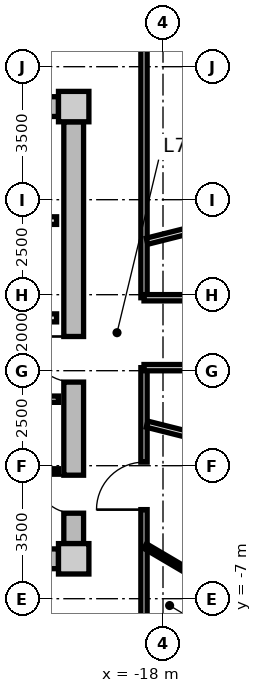
"""IFC4 building model, lengths in metres.
Left out: names, types, materials, properties, quantities, classifications, styles, units other than length and angle.
Written with IfcOpenShell. Run it as: python <this file> out.ifc"""

import sys

from ifc_helpers import new_model, si_unit, direction, frame, frame_2d, origin, origin_2d, place, context, subcontext, project, spatial, rectangle, extrude, source, transform, mapped, element, fill, save


model = new_model("IFC4")
c1 = context("Model", 3, precision=1e-05, world=origin(), true_north=direction((0.0, 1.0)))
c2 = subcontext(c1, "Body", "Model", "MODEL_VIEW")
j1 = project(units=[si_unit("LENGTHUNIT", "METRE"), si_unit("PLANEANGLEUNIT", "RADIAN")], contexts=[c1])
p1 = place(None, origin())
s1 = spatial("IfcSite", under=j1, at=p1, CompositionType="ELEMENT")
p2 = place(p1, origin())
s2 = spatial("IfcBuilding", under=s1, at=p2, CompositionType="ELEMENT")
p3 = place(p2, frame((0.0, 0.0, 226.1)))
s3 = spatial("IfcBuildingStorey", under=s2, at=p3, CompositionType="ELEMENT", Elevation=226.1)
m1 = source(origin(), c2, "Body", "SweptSolid", [
    extrude(rectangle(XDim=0.8, YDim=0.8, at=origin_2d()), origin(), (0.0, 0.0, 1.0), 3.05),
])
for number, where, z_axis, x_axis in (
    (1, (-20.35, -5.95, 0.0), (0.0, 0.0, 1.0), (1.0, 0.0, 0.0)),
    (2, (-20.35, 5.95, 0.0), (0.0, 0.0, 1.0), (1.0, 0.0, 0.0)),
):
    element("IfcColumn", number, at=place(p3, frame(where, z_axis=z_axis, x_axis=x_axis)), inside=s3, PredefinedType="COLUMN", context=c2, shape_type="MappedRepresentation", body=[
        mapped(m1, transform((0.0, 0.0, 0.0), x_axis=(1.0, 0.0, 0.0), y_axis=(0.0, 1.0, 0.0), z_axis=(0.0, 0.0, 1.0), scale=1.0)),
    ])
m2 = source(origin(), c2, "Body", "SweptSolid", [
    extrude(rectangle(XDim=14.5, YDim=0.52, at=frame_2d((7.25, 0.0))), origin(), (0.0, 0.0, 1.0), 2.76),
])
for number, where, z_axis, x_axis in (
    (3, (-35.25, 5.95, 0.0), (0.0, 0.0, 1.0), (1.0, 0.0, 0.0)),
    (4, (-20.75, -5.95, 0.0), (0.0, 0.0, 1.0), (-1.0, 0.0, 0.0)),
):
    element("IfcWall", number, at=place(p3, frame(where, z_axis=z_axis, x_axis=x_axis)), inside=s3, PredefinedType="SHEAR", context=c2, shape_type="MappedRepresentation", body=[
        mapped(m2, transform((0.0, 0.0, 0.0), x_axis=(1.0, 0.0, 0.0), y_axis=(0.0, 1.0, 0.0), z_axis=(0.0, 0.0, 1.0), scale=1.0)),
    ])
m3 = source(origin(), c2, "Body", "SweptSolid", [
    extrude(rectangle(XDim=11.1, YDim=0.52, at=frame_2d((5.55, 0.0))), origin(), (0.0, 0.0, 1.0), 2.76),
])
p4 = place(p3, frame((-20.35, 5.55, 0.0), z_axis=(0.0, 0.0, 1.0), x_axis=(0.0, -1.0, 0.0)))
e5 = element("IfcWall", 5, at=p4, inside=s3, PredefinedType="SHEAR", context=c2, shape_type="MappedRepresentation", body=[
    mapped(m3, transform((0.0, 0.0, 0.0), x_axis=(1.0, 0.0, 0.0), y_axis=(0.0, 1.0, 0.0), z_axis=(0.0, 0.0, 1.0), scale=1.0)),
])
p5 = place(p4, frame((5.65, 0.0, 0.0)))
e6 = element("IfcOpeningElement", 6, at=p5, cuts=e5, PredefinedType="OPENING", context=c2, shape_type="SweptSolid", body=[
    extrude(rectangle(XDim=1.2, YDim=2.15, at=frame_2d((0.6, 1.075))), frame((0.0, 0.27, 0.0), z_axis=(0.0, -1.0, 0.0), x_axis=(1.0, 0.0, 0.0)), (0.0, 0.0, 1.0), 0.54),
])
p6 = place(p4, frame((9.3, 0.0, 0.0)))
e7 = element("IfcOpeningElement", 7, at=p6, cuts=e5, PredefinedType="OPENING", context=c2, shape_type="SweptSolid", body=[
    extrude(rectangle(XDim=1.0, YDim=2.1, at=frame_2d((0.5, 1.05))), frame((0.0, 0.27, 0.0), z_axis=(0.0, -1.0, 0.0), x_axis=(1.0, 0.0, 0.0)), (0.0, 0.0, 1.0), 0.54),
])
m4 = source(origin(), c2, "Body", "SweptSolid", [
    extrude(rectangle(XDim=3.2, YDim=0.2, at=frame_2d((1.6, 0.0))), origin(), (0.0, 0.0, 1.0), 2.745),
])
p7 = place(p3, frame((-24.0, 2.95, 0.0), z_axis=(0.0, 0.0, 1.0), x_axis=(1.0, 0.0, 0.0)))
e8 = element("IfcWall", 8, at=p7, inside=s3, PredefinedType="PARTITIONING", context=c2, shape_type="MappedRepresentation", body=[
    mapped(m4, transform((0.0, 0.0, 0.0), x_axis=(1.0, 0.0, 0.0), y_axis=(0.0, 1.0, 0.0), z_axis=(0.0, 0.0, 1.0), scale=1.0)),
])
m5 = source(origin(), c2, "Body", "SweptSolid", [
    extrude(rectangle(XDim=6.66, YDim=0.21, at=frame_2d((3.33, 0.0))), origin(), (0.0, 0.0, 1.0), 2.745),
])
p8 = place(p3, frame((-27.46, 0.39, 0.0), z_axis=(0.0, 0.0, 1.0), x_axis=(1.0, 0.0, 0.0)))
e9 = element("IfcWall", 9, at=p8, inside=s3, PredefinedType="PARTITIONING", context=c2, shape_type="MappedRepresentation", body=[
    mapped(m5, transform((0.0, 0.0, 0.0), x_axis=(1.0, 0.0, 0.0), y_axis=(0.0, 1.0, 0.0), z_axis=(0.0, 0.0, 1.0), scale=1.0)),
])
p9 = place(p8, frame((1.0, 0.0, 0.0)))
e10 = element("IfcOpeningElement", 10, at=p9, cuts=e9, PredefinedType="OPENING", context=c2, shape_type="SweptSolid", body=[
    extrude(rectangle(XDim=1.2, YDim=2.15, at=frame_2d((0.6, 1.075))), frame((0.0, 0.115, 0.0), z_axis=(0.0, -1.0, 0.0), x_axis=(1.0, 0.0, 0.0)), (0.0, 0.0, 1.0), 0.23),
])
m6 = source(origin(), c2, "Body", "SweptSolid", [
    extrude(rectangle(XDim=2.7, YDim=0.165, at=frame_2d((1.35, 0.0))), origin(), (0.0, 0.0, 1.0), 2.745),
])
p10 = place(p3, frame((-23.45, -1.75, 0.0), z_axis=(0.0, 0.0, 1.0), x_axis=(1.0, 0.0, 0.0)))
e11 = element("IfcWall", 11, at=p10, inside=s3, PredefinedType="PARTITIONING", context=c2, shape_type="MappedRepresentation", body=[
    mapped(m6, transform((0.0, 0.0, 0.0), x_axis=(1.0, 0.0, 0.0), y_axis=(0.0, 1.0, 0.0), z_axis=(0.0, 0.0, 1.0), scale=1.0)),
])
p11 = place(p10, frame((0.85, 0.0, 0.0)))
e12 = element("IfcOpeningElement", 12, at=p11, cuts=e11, PredefinedType="OPENING", context=c2, shape_type="SweptSolid", body=[
    extrude(rectangle(XDim=0.925, YDim=2.1, at=frame_2d((0.462, 1.05))), frame((0.0, 0.093, 0.0), z_axis=(0.0, -1.0, 0.0), x_axis=(1.0, 0.0, 0.0)), (0.0, 0.0, 1.0), 0.185),
])
m7 = source(origin(), c2, "Body", "SweptSolid", [
    extrude(rectangle(XDim=2.7, YDim=0.14, at=frame_2d((1.35, 0.0))), origin(), (0.0, 0.0, 1.0), 2.745),
])
p12 = place(p3, frame((-23.45, -3.65, 0.0), z_axis=(0.0, 0.0, 1.0), x_axis=(1.0, 0.0, 0.0)))
e13 = element("IfcWall", 13, at=p12, inside=s3, PredefinedType="PARTITIONING", context=c2, shape_type="MappedRepresentation", body=[
    mapped(m7, transform((0.0, 0.0, 0.0), x_axis=(1.0, 0.0, 0.0), y_axis=(0.0, 1.0, 0.0), z_axis=(0.0, 0.0, 1.0), scale=1.0)),
])
m8 = source(origin(), c2, "Body", "SweptSolid", [
    extrude(rectangle(XDim=6.88, YDim=0.165, at=frame_2d((3.44, 0.0))), origin(), (0.0, 0.0, 1.0), 2.745),
])
p13 = place(p3, frame((-18.5, 7.8, 0.0), z_axis=(0.0, 0.0, 1.0), x_axis=(0.0, -1.0, 0.0)))
e14 = element("IfcWall", 14, at=p13, inside=s3, PredefinedType="PARTITIONING", context=c2, shape_type="MappedRepresentation", body=[
    mapped(m8, transform((0.0, 0.0, 0.0), x_axis=(1.0, 0.0, 0.0), y_axis=(0.0, 1.0, 0.0), z_axis=(0.0, 0.0, 1.0), scale=1.0)),
])
p14 = place(p3, frame((-18.5, -0.92, 0.0), z_axis=(0.0, 0.0, 1.0), x_axis=(0.0, -1.0, 0.0)))
e15 = element("IfcWall", 15, at=p14, inside=s3, PredefinedType="PARTITIONING", context=c2, shape_type="MappedRepresentation", body=[
    mapped(m8, transform((0.0, 0.0, 0.0), x_axis=(1.0, 0.0, 0.0), y_axis=(0.0, 1.0, 0.0), z_axis=(0.0, 0.0, 1.0), scale=1.0)),
])
p15 = place(p14, frame((2.486, 0.0, 0.0)))
e16 = element("IfcOpeningElement", 16, at=p15, cuts=e15, PredefinedType="OPENING", context=c2, shape_type="SweptSolid", body=[
    extrude(rectangle(XDim=1.25, YDim=2.2, at=frame_2d((0.625, 1.1))), frame((0.0, 0.093, 0.0), z_axis=(0.0, -1.0, 0.0), x_axis=(1.0, 0.0, 0.0)), (0.0, 0.0, 1.0), 0.185),
])
m9 = source(origin(), c2, "Body", "SweptSolid", [
    extrude(rectangle(XDim=6.157, YDim=0.165, at=frame_2d((3.079, 0.0))), origin(), (0.0, 0.0, 1.0), 2.345),
])
for number, where, z_axis, x_axis in (
    (17, (-18.42, -2.407, 0.0), (0.0, 0.0, 1.0), (0.97, -0.244, 0.0)),
    (18, (-18.42, 2.407, 0.0), (0.0, 0.0, 1.0), (0.97, 0.244, 0.0)),
):
    element("IfcWall", number, at=place(p3, frame(where, z_axis=z_axis, x_axis=x_axis)), inside=s3, PredefinedType="PARTITIONING", context=c2, shape_type="MappedRepresentation", body=[
        mapped(m9, transform((0.0, 0.0, 0.0), x_axis=(1.0, 0.0, 0.0), y_axis=(0.0, 1.0, 0.0), z_axis=(0.0, 0.0, 1.0), scale=1.0)),
    ])
m10 = source(origin(), c2, "Body", "SweptSolid", [
    extrude(rectangle(XDim=1.859, YDim=0.14, at=frame_2d((0.93, 0.0))), origin(), (0.0, 0.0, 1.0), 2.745),
])
p16 = place(p3, frame((-18.47, -5.615, 0.0), z_axis=(0.0, 0.0, 1.0), x_axis=(0.861555897139, -0.507662718845, 0.0)))
e19 = element("IfcWall", 19, at=p16, inside=s3, PredefinedType="PARTITIONING", context=c2, shape_type="MappedRepresentation", body=[
    mapped(m10, transform((0.0, 0.0, 0.0), x_axis=(1.0, 0.0, 0.0), y_axis=(0.0, 1.0, 0.0), z_axis=(0.0, 0.0, 1.0), scale=1.0)),
])
m11 = source(origin(), c2, "Body", "SweptSolid", [
    extrude(rectangle(XDim=2.939, YDim=0.14, at=frame_2d((1.47, 0.0))), origin(), (0.0, 0.0, 1.0), 2.745),
])
p17 = place(p3, frame((-16.868, -6.559, 0.0), z_axis=(0.0, 0.0, 1.0), x_axis=(-0.505883614636, -0.862601743821, 0.0)))
e20 = element("IfcWall", 20, at=p17, inside=s3, PredefinedType="PARTITIONING", context=c2, shape_type="MappedRepresentation", body=[
    mapped(m11, transform((0.0, 0.0, 0.0), x_axis=(1.0, 0.0, 0.0), y_axis=(0.0, 1.0, 0.0), z_axis=(0.0, 0.0, 1.0), scale=1.0)),
])
p18 = place(p17, frame((1.01, 0.0, 0.0)))
e21 = element("IfcOpeningElement", 21, at=p18, cuts=e20, PredefinedType="OPENING", context=c2, shape_type="SweptSolid", body=[
    extrude(rectangle(XDim=0.92, YDim=2.1, at=frame_2d((0.46, 1.05))), frame((0.0, 0.08, 0.0), z_axis=(0.0, -1.0, 0.0), x_axis=(1.0, 0.0, 0.0)), (0.0, 0.0, 1.0), 0.16),
])
m12 = source(origin(), c2, "Body", "SweptSolid", [
    extrude(rectangle(XDim=37.0, YDim=0.165, at=frame_2d((18.5, 0.0))), origin(), (0.0, 0.0, 1.0), 2.745),
])
p19 = place(p3, frame((-18.5, -0.92, 0.0), z_axis=(0.0, 0.0, 1.0), x_axis=(1.0, 0.0, 0.0)))
e22 = element("IfcWall", 22, at=p19, inside=s3, PredefinedType="PARTITIONING", context=c2, shape_type="MappedRepresentation", body=[
    mapped(m12, transform((0.0, 0.0, 0.0), x_axis=(1.0, 0.0, 0.0), y_axis=(0.0, 1.0, 0.0), z_axis=(0.0, 0.0, 1.0), scale=1.0)),
])
p20 = place(p19, frame((2.662, 0.0, 0.0)))
e23 = element("IfcOpeningElement", 23, at=p20, cuts=e22, PredefinedType="OPENING", context=c2, shape_type="SweptSolid", body=[
    extrude(rectangle(XDim=0.95, YDim=2.1, at=frame_2d((0.475, 1.05))), frame((0.0, 0.093, 0.0), z_axis=(0.0, -1.0, 0.0), x_axis=(1.0, 0.0, 0.0)), (0.0, 0.0, 1.0), 0.185),
])
p21 = place(p19, frame((33.388, 0.0, 0.0)))
e24 = element("IfcOpeningElement", 24, at=p21, cuts=e22, PredefinedType="OPENING", context=c2, shape_type="SweptSolid", body=[
    extrude(rectangle(XDim=0.95, YDim=2.1, at=frame_2d((0.475, 1.05))), frame((0.0, 0.093, 0.0), z_axis=(0.0, -1.0, 0.0), x_axis=(1.0, 0.0, 0.0)), (0.0, 0.0, 1.0), 0.185),
])
p22 = place(p19, frame((12.71, 0.0, 0.0)))
e25 = element("IfcOpeningElement", 25, at=p22, cuts=e22, PredefinedType="OPENING", context=c2, shape_type="SweptSolid", body=[
    extrude(rectangle(XDim=1.25, YDim=2.2, at=frame_2d((0.625, 1.1))), frame((0.0, 0.093, 0.0), z_axis=(0.0, -1.0, 0.0), x_axis=(1.0, 0.0, 0.0)), (0.0, 0.0, 1.0), 0.185),
])
p23 = place(p19, frame((20.875, 0.0, 0.0)))
e26 = element("IfcOpeningElement", 26, at=p23, cuts=e22, PredefinedType="OPENING", context=c2, shape_type="SweptSolid", body=[
    extrude(rectangle(XDim=1.25, YDim=2.2, at=frame_2d((0.625, 1.1))), frame((0.0, 0.093, 0.0), z_axis=(0.0, -1.0, 0.0), x_axis=(1.0, 0.0, 0.0)), (0.0, 0.0, 1.0), 0.185),
])
p24 = place(p19, frame((26.675, 0.0, 0.0)))
e27 = element("IfcOpeningElement", 27, at=p24, cuts=e22, PredefinedType="OPENING", context=c2, shape_type="SweptSolid", body=[
    extrude(rectangle(XDim=1.25, YDim=2.2, at=frame_2d((0.625, 1.1))), frame((0.0, 0.093, 0.0), z_axis=(0.0, -1.0, 0.0), x_axis=(1.0, 0.0, 0.0)), (0.0, 0.0, 1.0), 0.185),
])
p25 = place(p3, frame((-18.5, 0.92, 0.0), z_axis=(0.0, 0.0, 1.0), x_axis=(1.0, 0.0, 0.0)))
e28 = element("IfcWall", 28, at=p25, inside=s3, PredefinedType="PARTITIONING", context=c2, shape_type="MappedRepresentation", body=[
    mapped(m12, transform((0.0, 0.0, 0.0), x_axis=(1.0, 0.0, 0.0), y_axis=(0.0, 1.0, 0.0), z_axis=(0.0, 0.0, 1.0), scale=1.0)),
])
p26 = place(p25, frame((2.662, 0.0, 0.0)))
e29 = element("IfcOpeningElement", 29, at=p26, cuts=e28, PredefinedType="OPENING", context=c2, shape_type="SweptSolid", body=[
    extrude(rectangle(XDim=0.95, YDim=2.1, at=frame_2d((0.475, 1.05))), frame((0.0, 0.093, 0.0), z_axis=(0.0, -1.0, 0.0), x_axis=(1.0, 0.0, 0.0)), (0.0, 0.0, 1.0), 0.185),
])
p27 = place(p25, frame((33.388, 0.0, 0.0)))
e30 = element("IfcOpeningElement", 30, at=p27, cuts=e28, PredefinedType="OPENING", context=c2, shape_type="SweptSolid", body=[
    extrude(rectangle(XDim=0.95, YDim=2.1, at=frame_2d((0.475, 1.05))), frame((0.0, 0.093, 0.0), z_axis=(0.0, -1.0, 0.0), x_axis=(1.0, 0.0, 0.0)), (0.0, 0.0, 1.0), 0.185),
])
p28 = place(p25, frame((7.64, 0.0, 0.0)))
e31 = element("IfcOpeningElement", 31, at=p28, cuts=e28, PredefinedType="OPENING", context=c2, shape_type="SweptSolid", body=[
    extrude(rectangle(XDim=0.92, YDim=2.1, at=frame_2d((0.46, 1.05))), frame((0.0, 0.093, 0.0), z_axis=(0.0, -1.0, 0.0), x_axis=(1.0, 0.0, 0.0)), (0.0, 0.0, 1.0), 0.185),
])
p29 = place(p25, frame((13.275, 0.0, 0.0)))
e32 = element("IfcOpeningElement", 32, at=p29, cuts=e28, PredefinedType="OPENING", context=c2, shape_type="SweptSolid", body=[
    extrude(rectangle(XDim=1.25, YDim=2.2, at=frame_2d((0.625, 1.1))), frame((0.0, 0.093, 0.0), z_axis=(0.0, -1.0, 0.0), x_axis=(1.0, 0.0, 0.0)), (0.0, 0.0, 1.0), 0.185),
])
p30 = place(p25, frame((20.875, 0.0, 0.0)))
e33 = element("IfcOpeningElement", 33, at=p30, cuts=e28, PredefinedType="OPENING", context=c2, shape_type="SweptSolid", body=[
    extrude(rectangle(XDim=1.25, YDim=2.2, at=frame_2d((0.625, 1.1))), frame((0.0, 0.093, 0.0), z_axis=(0.0, -1.0, 0.0), x_axis=(1.0, 0.0, 0.0)), (0.0, 0.0, 1.0), 0.185),
])
p31 = place(p25, frame((26.675, 0.0, 0.0)))
e34 = element("IfcOpeningElement", 34, at=p31, cuts=e28, PredefinedType="OPENING", context=c2, shape_type="SweptSolid", body=[
    extrude(rectangle(XDim=1.25, YDim=2.2, at=frame_2d((0.625, 1.1))), frame((0.0, 0.093, 0.0), z_axis=(0.0, -1.0, 0.0), x_axis=(1.0, 0.0, 0.0)), (0.0, 0.0, 1.0), 0.185),
])
m13 = source(origin(), c2, "Body", "SweptSolid", [
    extrude(rectangle(XDim=1.2, YDim=2.15, at=frame_2d((0.6, 1.075))), frame((0.0, 0.025, 0.0), z_axis=(0.0, -1.0, 0.0), x_axis=(1.0, 0.0, 0.0)), (0.0, 0.0, 1.0), 0.05),
])
p32 = place(p5, frame((1.2, 0.0, 0.0), z_axis=(0.0, 0.0, 1.0), x_axis=(-1.0, 0.0, 0.0)))
e35 = element("IfcDoor", 35, at=p32, inside=s3, OperationType="SINGLE_SWING_RIGHT", PredefinedType="DOOR", context=c2, shape_type="MappedRepresentation", body=[
    mapped(m13, transform((0.0, 0.0, 0.0), x_axis=(1.0, 0.0, 0.0), y_axis=(0.0, 1.0, 0.0), z_axis=(0.0, 0.0, 1.0), scale=1.0)),
])
fill(e6, e35)
m14 = source(origin(), c2, "Body", "SweptSolid", [
    extrude(rectangle(XDim=1.0, YDim=2.1, at=frame_2d((0.5, 1.05))), frame((0.0, 0.025, 0.0), z_axis=(0.0, -1.0, 0.0), x_axis=(1.0, 0.0, 0.0)), (0.0, 0.0, 1.0), 0.05),
])
p33 = place(p6, frame((1.0, 0.0, 0.0), z_axis=(0.0, 0.0, 1.0), x_axis=(-1.0, 0.0, 0.0)))
e36 = element("IfcDoor", 36, at=p33, inside=s3, OperationType="SINGLE_SWING_RIGHT", PredefinedType="DOOR", context=c2, shape_type="MappedRepresentation", body=[
    mapped(m14, transform((0.0, 0.0, 0.0), x_axis=(1.0, 0.0, 0.0), y_axis=(0.0, 1.0, 0.0), z_axis=(0.0, 0.0, 1.0), scale=1.0)),
])
fill(e7, e36)
m15 = source(origin(), c2, "Body", "SweptSolid", [
    extrude(rectangle(XDim=1.25, YDim=2.2, at=frame_2d((0.625, 1.1))), frame((0.0, 0.025, 0.0), z_axis=(0.0, -1.0, 0.0), x_axis=(1.0, 0.0, 0.0)), (0.0, 0.0, 1.0), 0.05),
])
p34 = place(p15, frame((1.25, 0.0, 0.0), z_axis=(0.0, 0.0, 1.0), x_axis=(-1.0, 0.0, 0.0)))
e37 = element("IfcDoor", 37, at=p34, inside=s3, OperationType="SINGLE_SWING_LEFT", PredefinedType="DOOR", context=c2, shape_type="MappedRepresentation", body=[
    mapped(m15, transform((0.0, 0.0, 0.0), x_axis=(1.0, 0.0, 0.0), y_axis=(0.0, 1.0, 0.0), z_axis=(0.0, 0.0, 1.0), scale=1.0)),
])
fill(e16, e37)
save(model, sys.argv[1])
